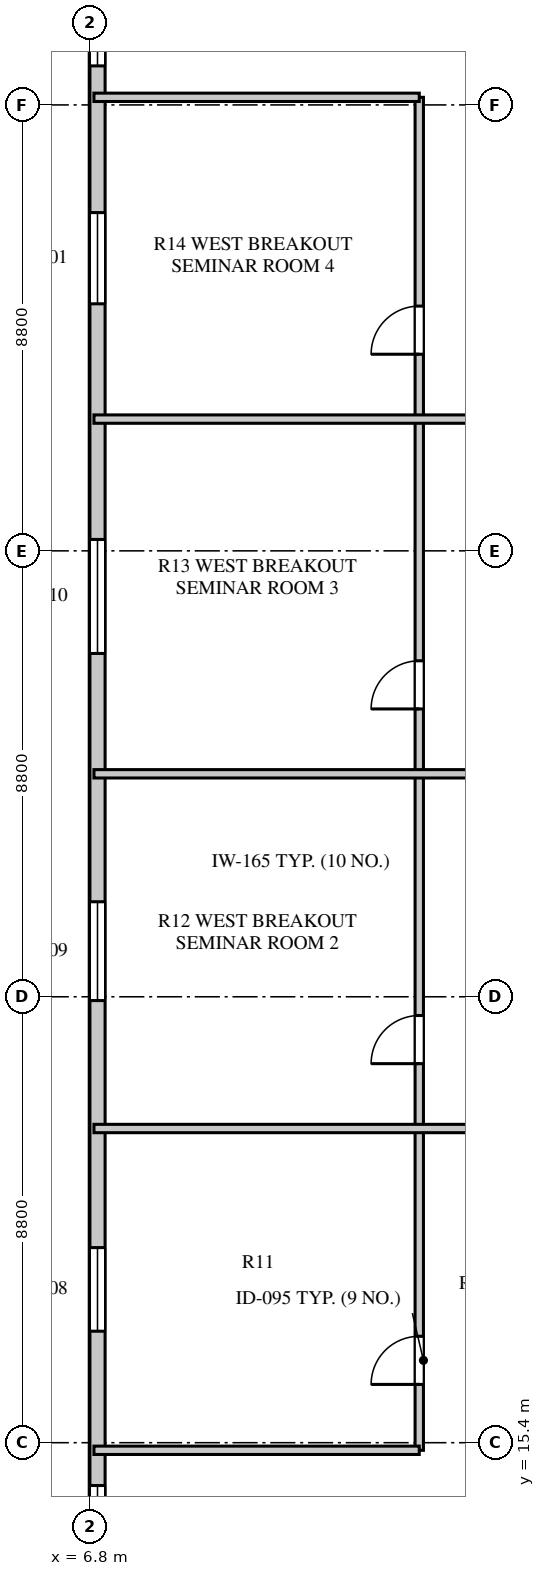
"""IFC4 building model, lengths in metres.
Left out: names, types, materials, properties, quantities, classifications, styles, units other than length and angle.
Written with IfcOpenShell. Run it as: python <this file> out.ifc"""

import sys

from ifc_helpers import new_model, si_unit, direction, frame, frame_2d, origin, place, context, subcontext, project, spatial, rectangle, extrude, element, fill, save


model = new_model("IFC4")
c1 = context("Model", 3, precision=1e-05, world=origin(), true_north=direction((0.0, 1.0)))
c2 = subcontext(c1, "Body", "Model", "MODEL_VIEW")
j1 = project(units=[si_unit("LENGTHUNIT", "METRE"), si_unit("PLANEANGLEUNIT", "RADIAN")], contexts=[c1])
p1 = place(None, origin())
s1 = spatial("IfcSite", under=j1, at=p1, CompositionType="ELEMENT")
p2 = place(p1, origin())
s2 = spatial("IfcBuilding", under=s1, at=p2, CompositionType="ELEMENT")
p3 = place(p2, frame((0.0, 0.0, 17.0)))
s3 = spatial("IfcBuildingStorey", under=s2, at=p3, CompositionType="ELEMENT", Elevation=17.0)
p4 = place(p3, frame((6.95, 44.8, 0.0), z_axis=(0.0, 0.0, 1.0), x_axis=(0.0, -1.0, 0.0)))
e1 = element("IfcWall", 1, at=p4, inside=s3, PredefinedType="STANDARD", context=c2, shape_type="SweptSolid", body=[
    extrude(rectangle(XDim=32.4, YDim=0.3, at=frame_2d((16.2, 0.0))), origin(), (0.0, 0.0, 1.0), 4.22),
])
p5 = place(p4, frame((30.245, 0.0, 0.8)))
e2 = element("IfcOpeningElement", 2, at=p5, cuts=e1, PredefinedType="OPENING", context=c2, shape_type="SweptSolid", body=[
    extrude(rectangle(XDim=1.35, YDim=1.9, at=frame_2d((0.675, 0.95))), frame((0.0, 0.16, 0.0), z_axis=(0.0, -1.0, 0.0), x_axis=(1.0, 0.0, 0.0)), (0.0, 0.0, 1.0), 0.32),
])
p6 = place(p4, frame((25.55, 0.0, 0.8)))
e3 = element("IfcOpeningElement", 3, at=p6, cuts=e1, PredefinedType="OPENING", context=c2, shape_type="SweptSolid", body=[
    extrude(rectangle(XDim=1.65, YDim=1.95, at=frame_2d((0.825, 0.975))), frame((0.0, 0.16, 0.0), z_axis=(0.0, -1.0, 0.0), x_axis=(1.0, 0.0, 0.0)), (0.0, 0.0, 1.0), 0.32),
])
p7 = place(p4, frame((18.725, 0.0, 0.8)))
e4 = element("IfcOpeningElement", 4, at=p7, cuts=e1, PredefinedType="OPENING", context=c2, shape_type="SweptSolid", body=[
    extrude(rectangle(XDim=1.95, YDim=2.0, at=frame_2d((0.975, 1.0))), frame((0.0, 0.16, 0.0), z_axis=(0.0, -1.0, 0.0), x_axis=(1.0, 0.0, 0.0)), (0.0, 0.0, 1.0), 0.32),
])
p8 = place(p4, frame((11.575, 0.0, 0.8)))
e5 = element("IfcOpeningElement", 5, at=p8, cuts=e1, PredefinedType="OPENING", context=c2, shape_type="SweptSolid", body=[
    extrude(rectangle(XDim=2.25, YDim=2.0, at=frame_2d((1.125, 1.0))), frame((0.0, 0.16, 0.0), z_axis=(0.0, -1.0, 0.0), x_axis=(1.0, 0.0, 0.0)), (0.0, 0.0, 1.0), 0.32),
])
p9 = place(p4, frame((5.125, 0.0, 0.8)))
e6 = element("IfcOpeningElement", 6, at=p9, cuts=e1, PredefinedType="OPENING", context=c2, shape_type="SweptSolid", body=[
    extrude(rectangle(XDim=1.8, YDim=2.0, at=frame_2d((0.9, 1.0))), frame((0.0, 0.16, 0.0), z_axis=(0.0, -1.0, 0.0), x_axis=(1.0, 0.0, 0.0)), (0.0, 0.0, 1.0), 0.32),
])
p10 = place(p4, frame((0.73, 0.0, 0.8)))
e7 = element("IfcOpeningElement", 7, at=p10, cuts=e1, PredefinedType="OPENING", context=c2, shape_type="SweptSolid", body=[
    extrude(rectangle(XDim=1.5, YDim=2.0, at=frame_2d((0.75, 1.0))), frame((0.0, 0.16, 0.0), z_axis=(0.0, -1.0, 0.0), x_axis=(1.0, 0.0, 0.0)), (0.0, 0.0, 1.0), 0.32),
])
p11 = place(p3, frame((13.3, 15.25, 0.0), z_axis=(0.0, 0.0, 1.0), x_axis=(0.0, 1.0, 0.0)))
e8 = element("IfcWall", 8, at=p11, inside=s3, PredefinedType="PARTITIONING", context=c2, shape_type="SweptSolid", body=[
    extrude(rectangle(XDim=26.7, YDim=0.165, at=frame_2d((13.35, 0.0))), origin(), (0.0, 0.0, 1.0), 4.22),
])
p12 = place(p11, frame((1.3, 0.0, 0.0)))
e9 = element("IfcOpeningElement", 9, at=p12, cuts=e8, PredefinedType="OPENING", context=c2, shape_type="SweptSolid", body=[
    extrude(rectangle(XDim=0.95, YDim=2.08, at=frame_2d((0.475, 1.04))), frame((0.0, 0.093, 0.0), z_axis=(0.0, -1.0, 0.0), x_axis=(1.0, 0.0, 0.0)), (0.0, 0.0, 1.0), 0.185),
])
p13 = place(p11, frame((7.63, 0.0, 0.0)))
e10 = element("IfcOpeningElement", 10, at=p13, cuts=e8, PredefinedType="OPENING", context=c2, shape_type="SweptSolid", body=[
    extrude(rectangle(XDim=0.95, YDim=2.08, at=frame_2d((0.475, 1.04))), frame((0.0, 0.093, 0.0), z_axis=(0.0, -1.0, 0.0), x_axis=(1.0, 0.0, 0.0)), (0.0, 0.0, 1.0), 0.185),
])
p14 = place(p11, frame((14.63, 0.0, 0.0)))
e11 = element("IfcOpeningElement", 11, at=p14, cuts=e8, PredefinedType="OPENING", context=c2, shape_type="SweptSolid", body=[
    extrude(rectangle(XDim=0.95, YDim=2.08, at=frame_2d((0.475, 1.04))), frame((0.0, 0.093, 0.0), z_axis=(0.0, -1.0, 0.0), x_axis=(1.0, 0.0, 0.0)), (0.0, 0.0, 1.0), 0.185),
])
p15 = place(p11, frame((21.63, 0.0, 0.0)))
e12 = element("IfcOpeningElement", 12, at=p15, cuts=e8, PredefinedType="OPENING", context=c2, shape_type="SweptSolid", body=[
    extrude(rectangle(XDim=0.95, YDim=2.08, at=frame_2d((0.475, 1.04))), frame((0.0, 0.093, 0.0), z_axis=(0.0, -1.0, 0.0), x_axis=(1.0, 0.0, 0.0)), (0.0, 0.0, 1.0), 0.185),
])
for number, where, z_axis, x_axis in (
    (13, (6.88, 15.25, 0.0), (0.0, 0.0, 1.0), (1.0, 0.0, 0.0)),
    (14, (6.88, 41.95, 0.0), (0.0, 0.0, 1.0), (1.0, 0.0, 0.0)),
):
    element("IfcWall", number, at=place(p3, frame(where, z_axis=z_axis, x_axis=x_axis)), inside=s3, PredefinedType="PARTITIONING", context=c2, shape_type="SweptSolid", body=[
        extrude(rectangle(XDim=6.42, YDim=0.165, at=frame_2d((3.21, 0.0))), origin(), (0.0, 0.0, 1.0), 3.72),
    ])
for number, where, z_axis, x_axis in (
    (15, (6.88, 21.6, 0.0), (0.0, 0.0, 1.0), (1.0, 0.0, 0.0)),
    (16, (6.88, 28.6, 0.0), (0.0, 0.0, 1.0), (1.0, 0.0, 0.0)),
    (17, (6.88, 35.6, 0.0), (0.0, 0.0, 1.0), (1.0, 0.0, 0.0)),
):
    element("IfcWall", number, at=place(p3, frame(where, z_axis=z_axis, x_axis=x_axis)), inside=s3, PredefinedType="PARTITIONING", context=c2, shape_type="SweptSolid", body=[
        extrude(rectangle(XDim=8.24, YDim=0.165, at=frame_2d((4.12, 0.0))), origin(), (0.0, 0.0, 1.0), 4.22),
    ])
p16 = place(p5, origin())
e18 = element("IfcWindow", 18, at=p16, inside=s3, PartitioningType="SINGLE_PANEL", PredefinedType="WINDOW", context=c2, shape_type="SweptSolid", body=[
    extrude(rectangle(XDim=1.35, YDim=1.9, at=frame_2d((0.675, 0.95))), frame((0.0, 0.03, 0.0), z_axis=(0.0, -1.0, 0.0), x_axis=(1.0, 0.0, 0.0)), (0.0, 0.0, 1.0), 0.06),
])
fill(e2, e18)
p17 = place(p6, origin())
e19 = element("IfcWindow", 19, at=p17, inside=s3, PartitioningType="SINGLE_PANEL", PredefinedType="WINDOW", context=c2, shape_type="SweptSolid", body=[
    extrude(rectangle(XDim=1.65, YDim=1.95, at=frame_2d((0.825, 0.975))), frame((0.0, 0.03, 0.0), z_axis=(0.0, -1.0, 0.0), x_axis=(1.0, 0.0, 0.0)), (0.0, 0.0, 1.0), 0.06),
])
fill(e3, e19)
p18 = place(p7, origin())
e20 = element("IfcWindow", 20, at=p18, inside=s3, PartitioningType="SINGLE_PANEL", PredefinedType="WINDOW", context=c2, shape_type="SweptSolid", body=[
    extrude(rectangle(XDim=1.95, YDim=2.0, at=frame_2d((0.975, 1.0))), frame((0.0, 0.03, 0.0), z_axis=(0.0, -1.0, 0.0), x_axis=(1.0, 0.0, 0.0)), (0.0, 0.0, 1.0), 0.06),
])
fill(e4, e20)
p19 = place(p8, origin())
e21 = element("IfcWindow", 21, at=p19, inside=s3, PartitioningType="SINGLE_PANEL", PredefinedType="WINDOW", context=c2, shape_type="SweptSolid", body=[
    extrude(rectangle(XDim=2.25, YDim=2.0, at=frame_2d((1.125, 1.0))), frame((0.0, 0.03, 0.0), z_axis=(0.0, -1.0, 0.0), x_axis=(1.0, 0.0, 0.0)), (0.0, 0.0, 1.0), 0.06),
])
fill(e5, e21)
p20 = place(p9, origin())
e22 = element("IfcWindow", 22, at=p20, inside=s3, PartitioningType="SINGLE_PANEL", PredefinedType="WINDOW", context=c2, shape_type="SweptSolid", body=[
    extrude(rectangle(XDim=1.8, YDim=2.0, at=frame_2d((0.9, 1.0))), frame((0.0, 0.03, 0.0), z_axis=(0.0, -1.0, 0.0), x_axis=(1.0, 0.0, 0.0)), (0.0, 0.0, 1.0), 0.06),
])
fill(e6, e22)
p21 = place(p10, origin())
e23 = element("IfcWindow", 23, at=p21, inside=s3, PartitioningType="SINGLE_PANEL", PredefinedType="WINDOW", context=c2, shape_type="SweptSolid", body=[
    extrude(rectangle(XDim=1.5, YDim=2.0, at=frame_2d((0.75, 1.0))), frame((0.0, 0.03, 0.0), z_axis=(0.0, -1.0, 0.0), x_axis=(1.0, 0.0, 0.0)), (0.0, 0.0, 1.0), 0.06),
])
fill(e7, e23)
p22 = place(p12, origin())
e24 = element("IfcDoor", 24, at=p22, inside=s3, OperationType="SINGLE_SWING_LEFT", PredefinedType="DOOR", context=c2, shape_type="SweptSolid", body=[
    extrude(rectangle(XDim=0.95, YDim=2.08, at=frame_2d((0.475, 1.04))), frame((0.0, 0.025, 0.0), z_axis=(0.0, -1.0, 0.0), x_axis=(1.0, 0.0, 0.0)), (0.0, 0.0, 1.0), 0.05),
])
fill(e9, e24)
p23 = place(p13, origin())
e25 = element("IfcDoor", 25, at=p23, inside=s3, OperationType="SINGLE_SWING_LEFT", PredefinedType="DOOR", context=c2, shape_type="SweptSolid", body=[
    extrude(rectangle(XDim=0.95, YDim=2.08, at=frame_2d((0.475, 1.04))), frame((0.0, 0.025, 0.0), z_axis=(0.0, -1.0, 0.0), x_axis=(1.0, 0.0, 0.0)), (0.0, 0.0, 1.0), 0.05),
])
fill(e10, e25)
p24 = place(p14, origin())
e26 = element("IfcDoor", 26, at=p24, inside=s3, OperationType="SINGLE_SWING_LEFT", PredefinedType="DOOR", context=c2, shape_type="SweptSolid", body=[
    extrude(rectangle(XDim=0.95, YDim=2.08, at=frame_2d((0.475, 1.04))), frame((0.0, 0.025, 0.0), z_axis=(0.0, -1.0, 0.0), x_axis=(1.0, 0.0, 0.0)), (0.0, 0.0, 1.0), 0.05),
])
fill(e11, e26)
p25 = place(p15, origin())
e27 = element("IfcDoor", 27, at=p25, inside=s3, OperationType="SINGLE_SWING_LEFT", PredefinedType="DOOR", context=c2, shape_type="SweptSolid", body=[
    extrude(rectangle(XDim=0.95, YDim=2.08, at=frame_2d((0.475, 1.04))), frame((0.0, 0.025, 0.0), z_axis=(0.0, -1.0, 0.0), x_axis=(1.0, 0.0, 0.0)), (0.0, 0.0, 1.0), 0.05),
])
fill(e12, e27)
save(model, sys.argv[1])
